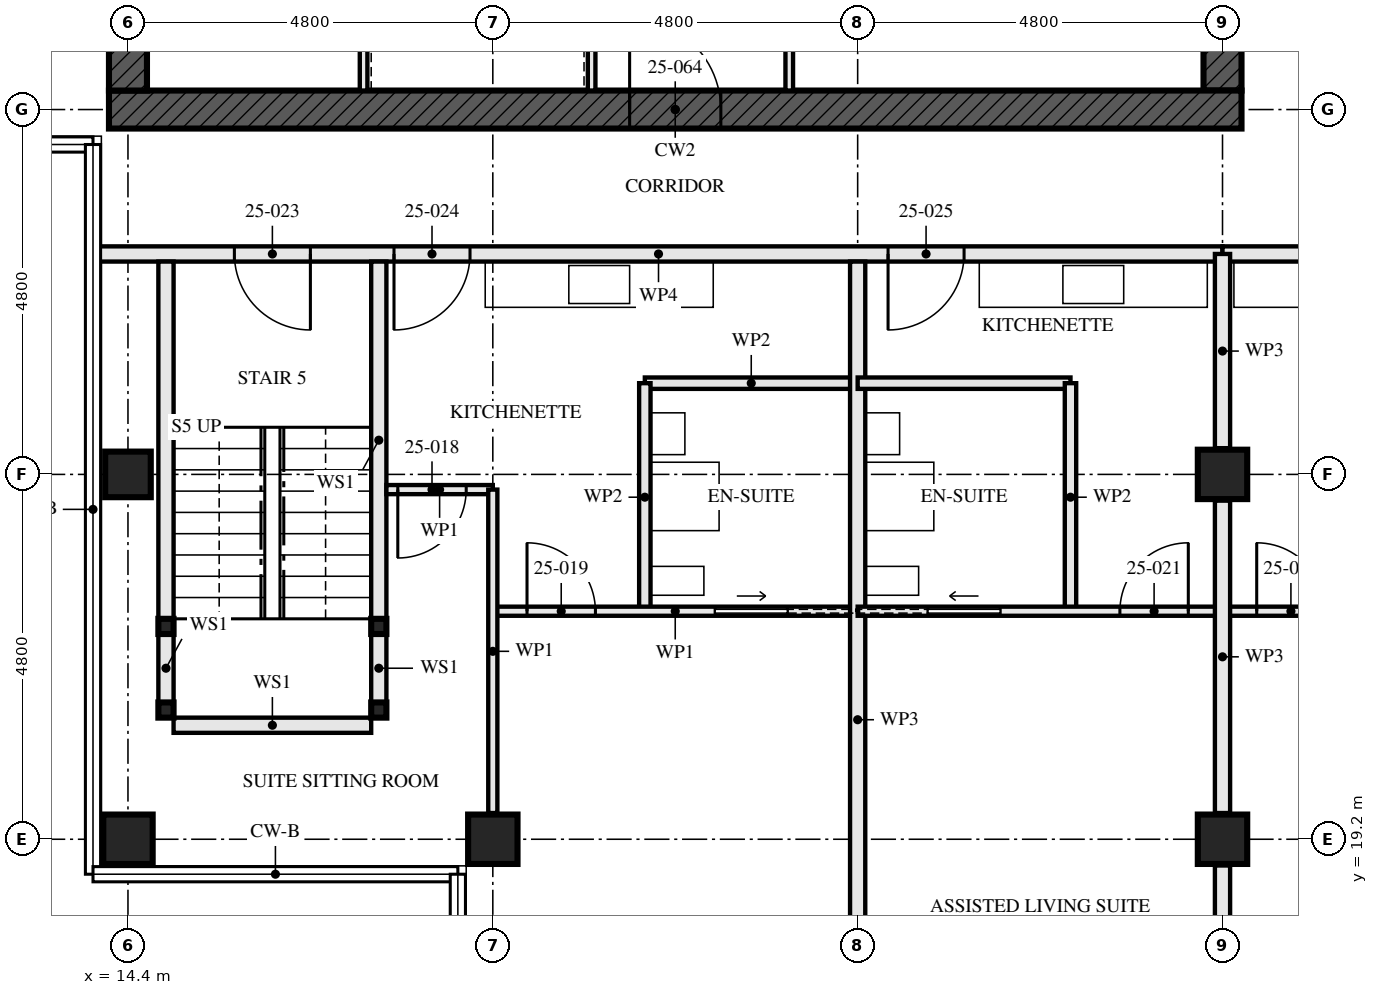
"""IFC4 building model, lengths in metres.
Left out: names, types, materials, properties, quantities, classifications, styles, units other than length and angle.
Written with IfcOpenShell. Run it as: python <this file> out.ifc"""

import sys

from ifc_helpers import new_model, si_unit, direction, frame, frame_2d, origin, origin_2d, place, context, subcontext, project, spatial, rectangle, hollow_rectangle, extrude, element, fill, save


model = new_model("IFC4")
c1 = context("Model", 3, precision=1e-05, world=origin(), true_north=direction((0.0, 1.0)))
c2 = subcontext(c1, "Body", "Model", "MODEL_VIEW")
j1 = project(units=[si_unit("LENGTHUNIT", "METRE"), si_unit("PLANEANGLEUNIT", "RADIAN")], contexts=[c1])
p1 = place(None, origin())
s1 = spatial("IfcSite", under=j1, at=p1, CompositionType="ELEMENT")
p2 = place(p1, origin())
s2 = spatial("IfcBuilding", under=s1, at=p2, CompositionType="ELEMENT")
p3 = place(p2, frame((0.0, 0.0, 94.5)))
s3 = spatial("IfcBuildingStorey", under=s2, at=p3, CompositionType="ELEMENT", Elevation=94.5)
p4 = place(p3, frame((14.4, 19.2, 0.0), z_axis=(0.0, 0.0, 1.0), x_axis=(0.0, 1.0, 0.0)))
e1 = element("IfcColumn", 1, at=p4, inside=s3, PredefinedType="COLUMN", context=c2, shape_type="SweptSolid", body=[
    extrude(hollow_rectangle(XDim=0.65, YDim=0.65, WallThickness=0.08, at=origin_2d()), origin(), (0.0, 0.0, 1.0), 3.5),
])
p5 = place(p3, frame((14.4, 24.0, 0.0), z_axis=(0.0, 0.0, 1.0), x_axis=(1.0, 0.0, 0.0)))
e2 = element("IfcColumn", 2, at=p5, inside=s3, PredefinedType="COLUMN", context=c2, shape_type="SweptSolid", body=[
    extrude(hollow_rectangle(XDim=0.6, YDim=0.6, WallThickness=0.08, at=origin_2d()), origin(), (0.0, 0.0, 1.0), 3.5),
])
p6 = place(p3, frame((19.2, 19.2, 0.0), z_axis=(0.0, 0.0, 1.0), x_axis=(0.0, 1.0, 0.0)))
e3 = element("IfcColumn", 3, at=p6, inside=s3, PredefinedType="COLUMN", context=c2, shape_type="SweptSolid", body=[
    extrude(hollow_rectangle(XDim=0.65, YDim=0.65, WallThickness=0.08, at=origin_2d()), origin(), (0.0, 0.0, 1.0), 3.5),
])
for number, where, z_axis, x_axis in (
    (4, (28.8, 19.2, 0.0), (0.0, 0.0, 1.0), (1.0, 0.0, 0.0)),
    (5, (28.8, 24.0, 0.0), (0.0, 0.0, 1.0), (1.0, 0.0, 0.0)),
):
    element("IfcColumn", number, at=place(p3, frame(where, z_axis=z_axis, x_axis=x_axis)), inside=s3, PredefinedType="COLUMN", context=c2, shape_type="SweptSolid", body=[
        extrude(hollow_rectangle(XDim=0.65, YDim=0.65, WallThickness=0.05, at=origin_2d()), origin(), (0.0, 0.0, 1.0), 3.5),
    ])
p7 = place(p3, frame((14.15, 28.8, -0.17), z_axis=(0.0, 0.0, 1.0), x_axis=(1.0, 0.0, 0.0)))
e6 = element("IfcWall", 6, at=p7, inside=s3, PredefinedType="SHEAR", context=c2, shape_type="SweptSolid", body=[
    extrude(rectangle(XDim=14.9, YDim=0.5, at=frame_2d((7.45, 0.0))), origin(), (0.0, 0.0, 1.0), 3.5),
])
p8 = place(p7, frame((6.85, 0.0, 0.17)))
e7 = element("IfcOpeningElement", 7, at=p8, cuts=e6, PredefinedType="OPENING", context=c2, shape_type="SweptSolid", body=[
    extrude(rectangle(XDim=1.2, YDim=2.1, at=frame_2d((0.6, 1.05))), frame((0.0, 0.26, 0.0), z_axis=(0.0, -1.0, 0.0), x_axis=(1.0, 0.0, 0.0)), (0.0, 0.0, 1.0), 0.521),
])
p9 = place(p3, frame((14.4, 42.95, -0.17), z_axis=(0.0, 0.0, 1.0), x_axis=(0.0, -1.0, 0.0)))
e8 = element("IfcWall", 8, at=p9, inside=s3, PredefinedType="SHEAR", context=c2, shape_type="SweptSolid", body=[
    extrude(rectangle(XDim=13.9, YDim=0.5, at=frame_2d((6.95, 0.0))), origin(), (0.0, 0.0, 1.0), 3.5),
])
p10 = place(p9, frame((6.35, 0.0, 0.17)))
e9 = element("IfcOpeningElement", 9, at=p10, cuts=e8, PredefinedType="OPENING", context=c2, shape_type="SweptSolid", body=[
    extrude(rectangle(XDim=1.2, YDim=2.1, at=frame_2d((0.6, 1.05))), frame((0.0, 0.26, 0.0), z_axis=(0.0, -1.0, 0.0), x_axis=(1.0, 0.0, 0.0)), (0.0, 0.0, 1.0), 0.521),
])
p11 = place(p3, frame((28.8, 29.05, -0.17), z_axis=(0.0, 0.0, 1.0), x_axis=(0.0, 1.0, 0.0)))
e10 = element("IfcWall", 10, at=p11, inside=s3, PredefinedType="SHEAR", context=c2, shape_type="SweptSolid", body=[
    extrude(rectangle(XDim=13.9, YDim=0.5, at=frame_2d((6.95, 0.0))), origin(), (0.0, 0.0, 1.0), 3.5),
])
p12 = place(p11, frame((6.35, 0.0, 0.17)))
e11 = element("IfcOpeningElement", 11, at=p12, cuts=e10, PredefinedType="OPENING", context=c2, shape_type="SweptSolid", body=[
    extrude(rectangle(XDim=1.2, YDim=2.1, at=frame_2d((0.6, 1.05))), frame((0.0, 0.26, 0.0), z_axis=(0.0, -1.0, 0.0), x_axis=(1.0, 0.0, 0.0)), (0.0, 0.0, 1.0), 0.521),
])
for number, where, z_axis, x_axis in (
    (12, (14.9, 20.9, 0.0), (0.0, 0.0, 1.0), (1.0, 0.0, 0.0)),
    (13, (17.7, 20.9, 0.0), (0.0, 0.0, 1.0), (1.0, 0.0, 0.0)),
    (14, (14.9, 22.0, 0.0), (0.0, 0.0, 1.0), (1.0, 0.0, 0.0)),
    (15, (17.7, 22.0, 0.0), (0.0, 0.0, 1.0), (1.0, 0.0, 0.0)),
):
    element("IfcColumn", number, at=place(p3, frame(where, z_axis=z_axis, x_axis=x_axis)), inside=s3, PredefinedType="COLUMN", context=c2, shape_type="SweptSolid", body=[
        extrude(hollow_rectangle(XDim=0.2, YDim=0.2, WallThickness=0.008, at=origin_2d()), origin(), (0.0, 0.0, 1.0), 3.33),
    ])
p13 = place(p3, frame((14.9, 21.0, 0.0), z_axis=(0.0, 0.0, 1.0), x_axis=(0.0, 1.0, 0.0)))
e16 = element("IfcWall", 16, at=p13, inside=s3, PredefinedType="SOLIDWALL", context=c2, shape_type="SweptSolid", body=[
    extrude(rectangle(XDim=0.9, YDim=0.2, at=frame_2d((0.45, 0.0))), origin(), (0.0, 0.0, 1.0), 2.99),
])
p14 = place(p3, frame((14.9, 22.1, 0.0), z_axis=(0.0, 0.0, 1.0), x_axis=(0.0, 1.0, 0.0)))
e17 = element("IfcWall", 17, at=p14, inside=s3, PredefinedType="SOLIDWALL", context=c2, shape_type="SweptSolid", body=[
    extrude(rectangle(XDim=4.7, YDim=0.2, at=frame_2d((2.35, 0.0))), origin(), (0.0, 0.0, 1.0), 2.99),
])
p15 = place(p3, frame((17.7, 21.0, 0.0), z_axis=(0.0, 0.0, 1.0), x_axis=(0.0, 1.0, 0.0)))
e18 = element("IfcWall", 18, at=p15, inside=s3, PredefinedType="SOLIDWALL", context=c2, shape_type="SweptSolid", body=[
    extrude(rectangle(XDim=0.9, YDim=0.2, at=frame_2d((0.45, 0.0))), origin(), (0.0, 0.0, 1.0), 2.99),
])
p16 = place(p3, frame((17.7, 22.1, 0.0), z_axis=(0.0, 0.0, 1.0), x_axis=(0.0, 1.0, 0.0)))
e19 = element("IfcWall", 19, at=p16, inside=s3, PredefinedType="SOLIDWALL", context=c2, shape_type="SweptSolid", body=[
    extrude(rectangle(XDim=4.7, YDim=0.2, at=frame_2d((2.35, 0.0))), origin(), (0.0, 0.0, 1.0), 2.99),
])
p17 = place(p3, frame((15.0, 20.7, 0.0), z_axis=(0.0, 0.0, 1.0), x_axis=(1.0, 0.0, 0.0)))
e20 = element("IfcWall", 20, at=p17, inside=s3, PredefinedType="SOLIDWALL", context=c2, shape_type="SweptSolid", body=[
    extrude(rectangle(XDim=2.6, YDim=0.2, at=frame_2d((1.3, 0.0))), origin(), (0.0, 0.0, 1.0), 3.33),
])
p18 = place(p3, frame((21.2, 22.2, 0.0), z_axis=(0.0, 0.0, 1.0), x_axis=(0.0, 1.0, 0.0)))
e21 = element("IfcWall", 21, at=p18, inside=s3, PredefinedType="PARTITIONING", context=c2, shape_type="SweptSolid", body=[
    extrude(rectangle(XDim=3.0, YDim=0.15, at=frame_2d((1.5, 0.0))), origin(), (0.0, 0.0, 1.0), 2.55),
])
p19 = place(p3, frame((21.2, 25.2, 0.0), z_axis=(0.0, 0.0, 1.0), x_axis=(1.0, 0.0, 0.0)))
e22 = element("IfcWall", 22, at=p19, inside=s3, PredefinedType="PARTITIONING", context=c2, shape_type="SweptSolid", body=[
    extrude(rectangle(XDim=2.8, YDim=0.15, at=frame_2d((1.4, 0.0))), origin(), (0.0, 0.0, 1.0), 3.33),
])
p20 = place(p3, frame((17.8, 23.8, 0.0), z_axis=(0.0, 0.0, 1.0), x_axis=(1.0, 0.0, 0.0)))
e23 = element("IfcWall", 23, at=p20, inside=s3, PredefinedType="PARTITIONING", context=c2, shape_type="SweptSolid", body=[
    extrude(rectangle(XDim=1.4, YDim=0.12, at=frame_2d((0.7, 0.0))), origin(), (0.0, 0.0, 1.0), 3.33),
])
p21 = place(p20, frame((0.15, 0.0, 0.0)))
e24 = element("IfcOpeningElement", 24, at=p21, cuts=e23, PredefinedType="OPENING", context=c2, shape_type="SweptSolid", body=[
    extrude(rectangle(XDim=0.9, YDim=2.1, at=frame_2d((0.45, 1.05))), frame((0.0, 0.071, 0.0), z_axis=(0.0, -1.0, 0.0), x_axis=(1.0, 0.0, 0.0)), (0.0, 0.0, 1.0), 0.141),
])
p22 = place(p3, frame((19.2, 22.2, 0.0), z_axis=(0.0, 0.0, 1.0), x_axis=(1.0, 0.0, 0.0)))
e25 = element("IfcWall", 25, at=p22, inside=s3, PredefinedType="PARTITIONING", context=c2, shape_type="SweptSolid", body=[
    extrude(rectangle(XDim=4.8, YDim=0.12, at=frame_2d((2.4, 0.0))), origin(), (0.0, 0.0, 1.0), 3.33),
])
p23 = place(p22, frame((0.45, 0.0, 0.0)))
e26 = element("IfcOpeningElement", 26, at=p23, cuts=e25, PredefinedType="OPENING", context=c2, shape_type="SweptSolid", body=[
    extrude(rectangle(XDim=0.9, YDim=2.1, at=frame_2d((0.45, 1.05))), frame((0.0, 0.071, 0.0), z_axis=(0.0, -1.0, 0.0), x_axis=(1.0, 0.0, 0.0)), (0.0, 0.0, 1.0), 0.141),
])
p24 = place(p22, frame((2.925, 0.0, 0.0)))
e27 = element("IfcOpeningElement", 27, at=p24, cuts=e25, PredefinedType="OPENING", context=c2, shape_type="SweptSolid", body=[
    extrude(rectangle(XDim=0.95, YDim=2.1, at=frame_2d((0.475, 1.05))), frame((0.0, 0.071, 0.0), z_axis=(0.0, -1.0, 0.0), x_axis=(1.0, 0.0, 0.0)), (0.0, 0.0, 1.0), 0.141),
])
p25 = place(p3, frame((19.2, 19.545, 0.0), z_axis=(0.0, 0.0, 1.0), x_axis=(0.0, 1.0, 0.0)))
e28 = element("IfcWall", 28, at=p25, inside=s3, PredefinedType="PARTITIONING", context=c2, shape_type="SweptSolid", body=[
    extrude(rectangle(XDim=4.255, YDim=0.12, at=frame_2d((2.127, 0.0))), origin(), (0.0, 0.0, 1.0), 2.55),
])
p26 = place(p3, frame((24.0, 14.745, 0.0), z_axis=(0.0, 0.0, 1.0), x_axis=(0.0, 1.0, 0.0)))
e29 = element("IfcWall", 29, at=p26, inside=s3, PredefinedType="PARTITIONING", context=c2, shape_type="SweptSolid", body=[
    extrude(rectangle(XDim=12.055, YDim=0.2, at=frame_2d((6.027, 0.0))), origin(), (0.0, 0.0, 1.0), 2.55),
])
p27 = place(p3, frame((26.8, 22.2, 0.0), z_axis=(0.0, 0.0, 1.0), x_axis=(0.0, 1.0, 0.0)))
e30 = element("IfcWall", 30, at=p27, inside=s3, PredefinedType="PARTITIONING", context=c2, shape_type="SweptSolid", body=[
    extrude(rectangle(XDim=3.0, YDim=0.15, at=frame_2d((1.5, 0.0))), origin(), (0.0, 0.0, 1.0), 2.55),
])
p28 = place(p3, frame((24.0, 25.2, 0.0), z_axis=(0.0, 0.0, 1.0), x_axis=(1.0, 0.0, 0.0)))
e31 = element("IfcWall", 31, at=p28, inside=s3, PredefinedType="PARTITIONING", context=c2, shape_type="SweptSolid", body=[
    extrude(rectangle(XDim=2.8, YDim=0.15, at=frame_2d((1.4, 0.0))), origin(), (0.0, 0.0, 1.0), 3.33),
])
p29 = place(p3, frame((24.0, 22.2, 0.0), z_axis=(0.0, 0.0, 1.0), x_axis=(1.0, 0.0, 0.0)))
e32 = element("IfcWall", 32, at=p29, inside=s3, PredefinedType="PARTITIONING", context=c2, shape_type="SweptSolid", body=[
    extrude(rectangle(XDim=4.8, YDim=0.12, at=frame_2d((2.4, 0.0))), origin(), (0.0, 0.0, 1.0), 3.33),
])
p30 = place(p29, frame((3.45, 0.0, 0.0)))
e33 = element("IfcOpeningElement", 33, at=p30, cuts=e32, PredefinedType="OPENING", context=c2, shape_type="SweptSolid", body=[
    extrude(rectangle(XDim=0.9, YDim=2.1, at=frame_2d((0.45, 1.05))), frame((0.0, 0.071, 0.0), z_axis=(0.0, -1.0, 0.0), x_axis=(1.0, 0.0, 0.0)), (0.0, 0.0, 1.0), 0.141),
])
p31 = place(p29, frame((0.925, 0.0, 0.0)))
e34 = element("IfcOpeningElement", 34, at=p31, cuts=e32, PredefinedType="OPENING", context=c2, shape_type="SweptSolid", body=[
    extrude(rectangle(XDim=0.95, YDim=2.1, at=frame_2d((0.475, 1.05))), frame((0.0, 0.071, 0.0), z_axis=(0.0, -1.0, 0.0), x_axis=(1.0, 0.0, 0.0)), (0.0, 0.0, 1.0), 0.141),
])
p32 = place(p3, frame((13.96, 26.9, 0.0), z_axis=(0.0, 0.0, 1.0), x_axis=(1.0, 0.0, 0.0)))
e35 = element("IfcWall", 35, at=p32, inside=s3, PredefinedType="PARTITIONING", context=c2, shape_type="SweptSolid", body=[
    extrude(rectangle(XDim=14.84, YDim=0.2, at=frame_2d((7.42, 0.0))), origin(), (0.0, 0.0, 1.0), 2.32),
])
p33 = place(p32, frame((1.84, 0.0, 0.0)))
e36 = element("IfcOpeningElement", 36, at=p33, cuts=e35, PredefinedType="OPENING", context=c2, shape_type="SweptSolid", body=[
    extrude(rectangle(XDim=1.0, YDim=2.1, at=frame_2d((0.5, 1.05))), frame((0.0, 0.111, 0.0), z_axis=(0.0, -1.0, 0.0), x_axis=(1.0, 0.0, 0.0)), (0.0, 0.0, 1.0), 0.221),
])
p34 = place(p32, frame((3.94, 0.0, 0.0)))
e37 = element("IfcOpeningElement", 37, at=p34, cuts=e35, PredefinedType="OPENING", context=c2, shape_type="SweptSolid", body=[
    extrude(rectangle(XDim=1.0, YDim=2.1, at=frame_2d((0.5, 1.05))), frame((0.0, 0.111, 0.0), z_axis=(0.0, -1.0, 0.0), x_axis=(1.0, 0.0, 0.0)), (0.0, 0.0, 1.0), 0.221),
])
p35 = place(p32, frame((10.44, 0.0, 0.0)))
e38 = element("IfcOpeningElement", 38, at=p35, cuts=e35, PredefinedType="OPENING", context=c2, shape_type="SweptSolid", body=[
    extrude(rectangle(XDim=1.0, YDim=2.1, at=frame_2d((0.5, 1.05))), frame((0.0, 0.111, 0.0), z_axis=(0.0, -1.0, 0.0), x_axis=(1.0, 0.0, 0.0)), (0.0, 0.0, 1.0), 0.221),
])
p36 = place(p3, frame((28.8, 22.2, 0.0), z_axis=(0.0, 0.0, 1.0), x_axis=(1.0, 0.0, 0.0)))
e39 = element("IfcWall", 39, at=p36, inside=s3, PredefinedType="PARTITIONING", context=c2, shape_type="SweptSolid", body=[
    extrude(rectangle(XDim=4.8, YDim=0.12, at=frame_2d((2.4, 0.0))), origin(), (0.0, 0.0, 1.0), 3.33),
])
p37 = place(p36, frame((0.45, 0.0, 0.0)))
e40 = element("IfcOpeningElement", 40, at=p37, cuts=e39, PredefinedType="OPENING", context=c2, shape_type="SweptSolid", body=[
    extrude(rectangle(XDim=0.9, YDim=2.1, at=frame_2d((0.45, 1.05))), frame((0.0, 0.071, 0.0), z_axis=(0.0, -1.0, 0.0), x_axis=(1.0, 0.0, 0.0)), (0.0, 0.0, 1.0), 0.141),
])
p38 = place(p3, frame((28.8, 26.9, 0.0), z_axis=(0.0, 0.0, 1.0), x_axis=(1.0, 0.0, 0.0)))
e41 = element("IfcWall", 41, at=p38, inside=s3, PredefinedType="PARTITIONING", context=c2, shape_type="SweptSolid", body=[
    extrude(rectangle(XDim=9.6, YDim=0.2, at=frame_2d((4.8, 0.0))), origin(), (0.0, 0.0, 1.0), 3.33),
])
p39 = place(p38, frame((5.2, 0.0, 0.0)))
e42 = element("IfcOpeningElement", 42, at=p39, cuts=e41, PredefinedType="OPENING", context=c2, shape_type="SweptSolid", body=[
    extrude(rectangle(XDim=1.0, YDim=2.1, at=frame_2d((0.5, 1.05))), frame((0.0, 0.111, 0.0), z_axis=(0.0, -1.0, 0.0), x_axis=(1.0, 0.0, 0.0)), (0.0, 0.0, 1.0), 0.221),
])
p40 = place(p3, frame((20.5, 29.05, 0.0), z_axis=(0.0, 0.0, 1.0), x_axis=(0.0, 1.0, 0.0)))
e43 = element("IfcWall", 43, at=p40, inside=s3, PredefinedType="SOLIDWALL", context=c2, shape_type="SweptSolid", body=[
    extrude(rectangle(XDim=5.8, YDim=0.1, at=frame_2d((2.9, 0.0))), origin(), (0.0, 0.0, 1.0), 3.33),
])
p41 = place(p40, frame((0.8, 0.0, 0.0)))
e44 = element("IfcOpeningElement", 44, at=p41, cuts=e43, PredefinedType="OPENING", context=c2, shape_type="SweptSolid", body=[
    extrude(rectangle(XDim=1.1, YDim=2.3, at=frame_2d((0.55, 1.15))), frame((0.0, 0.061, 0.0), z_axis=(0.0, -1.0, 0.0), x_axis=(1.0, 0.0, 0.0)), (0.0, 0.0, 1.0), 0.121),
])
p42 = place(p40, frame((3.775, 0.0, 0.0)))
e45 = element("IfcOpeningElement", 45, at=p42, cuts=e43, PredefinedType="OPENING", context=c2, shape_type="SweptSolid", body=[
    extrude(rectangle(XDim=1.1, YDim=2.3, at=frame_2d((0.55, 1.15))), frame((0.0, 0.061, 0.0), z_axis=(0.0, -1.0, 0.0), x_axis=(1.0, 0.0, 0.0)), (0.0, 0.0, 1.0), 0.121),
])
p43 = place(p3, frame((23.1, 29.05, 0.0), z_axis=(0.0, 0.0, 1.0), x_axis=(0.0, 1.0, 0.0)))
e46 = element("IfcWall", 46, at=p43, inside=s3, PredefinedType="SOLIDWALL", context=c2, shape_type="SweptSolid", body=[
    extrude(rectangle(XDim=5.8, YDim=0.1, at=frame_2d((2.9, 0.0))), origin(), (0.0, 0.0, 1.0), 3.33),
])
p44 = place(p43, frame((1.0, 0.0, 0.0)))
e47 = element("IfcOpeningElement", 47, at=p44, cuts=e46, PredefinedType="OPENING", context=c2, shape_type="SweptSolid", body=[
    extrude(rectangle(XDim=0.7, YDim=2.1, at=frame_2d((0.35, 1.05))), frame((0.0, 0.061, 0.0), z_axis=(0.0, -1.0, 0.0), x_axis=(1.0, 0.0, 0.0)), (0.0, 0.0, 1.0), 0.121),
])
p45 = place(p3, frame((17.5, 29.05, 0.0), z_axis=(0.0, 0.0, 1.0), x_axis=(0.0, 1.0, 0.0)))
e48 = element("IfcWall", 48, at=p45, inside=s3, PredefinedType="SOLIDWALL", context=c2, shape_type="SweptSolid", body=[
    extrude(rectangle(XDim=5.8, YDim=0.1, at=frame_2d((2.9, 0.0))), origin(), (0.0, 0.0, 1.0), 3.33),
])
p46 = place(p3, frame((28.8, 14.647, 0.0), z_axis=(0.0, 0.0, 1.0), x_axis=(0.0, 1.0, 0.0)))
e49 = element("IfcWall", 49, at=p46, inside=s3, PredefinedType="PARTITIONING", context=c2, shape_type="SweptSolid", body=[
    extrude(rectangle(XDim=4.208, YDim=0.2, at=frame_2d((2.104, 0.0))), origin(), (0.0, 0.0, 1.0), 2.32),
])
p47 = place(p3, frame((28.8, 19.545, 0.0), z_axis=(0.0, 0.0, 1.0), x_axis=(0.0, 1.0, 0.0)))
e50 = element("IfcWall", 50, at=p47, inside=s3, PredefinedType="PARTITIONING", context=c2, shape_type="SweptSolid", body=[
    extrude(rectangle(XDim=4.11, YDim=0.2, at=frame_2d((2.055, 0.0))), origin(), (0.0, 0.0, 1.0), 2.32),
])
p48 = place(p3, frame((28.8, 24.345, 0.0), z_axis=(0.0, 0.0, 1.0), x_axis=(0.0, 1.0, 0.0)))
e51 = element("IfcWall", 51, at=p48, inside=s3, PredefinedType="PARTITIONING", context=c2, shape_type="SweptSolid", body=[
    extrude(rectangle(XDim=2.555, YDim=0.2, at=frame_2d((1.277, 0.0))), origin(), (0.0, 0.0, 1.0), 2.32),
])
p49 = place(p21, frame((0.9, 0.0, 0.0), z_axis=(0.0, 0.0, 1.0), x_axis=(-1.0, 0.0, 0.0)))
e52 = element("IfcDoor", 52, at=p49, inside=s3, OperationType="SINGLE_SWING_LEFT", PredefinedType="DOOR", context=c2, shape_type="SweptSolid", body=[
    extrude(rectangle(XDim=0.9, YDim=2.1, at=frame_2d((0.45, 1.05))), frame((0.0, 0.022, 0.0), z_axis=(0.0, -1.0, 0.0), x_axis=(1.0, 0.0, 0.0)), (0.0, 0.0, 1.0), 0.044),
])
fill(e24, e52)
p50 = place(p23, origin())
e53 = element("IfcDoor", 53, at=p50, inside=s3, OperationType="SINGLE_SWING_RIGHT", PredefinedType="DOOR", context=c2, shape_type="SweptSolid", body=[
    extrude(rectangle(XDim=0.9, YDim=2.1, at=frame_2d((0.45, 1.05))), frame((0.0, 0.022, 0.0), z_axis=(0.0, -1.0, 0.0), x_axis=(1.0, 0.0, 0.0)), (0.0, 0.0, 1.0), 0.044),
])
fill(e26, e53)
p51 = place(p24, origin())
e54 = element("IfcDoor", 54, at=p51, inside=s3, OperationType="SLIDING_TO_LEFT", PredefinedType="DOOR", context=c2, shape_type="SweptSolid", body=[
    extrude(rectangle(XDim=0.95, YDim=2.1, at=frame_2d((0.475, 1.05))), frame((0.0, 0.022, 0.0), z_axis=(0.0, -1.0, 0.0), x_axis=(1.0, 0.0, 0.0)), (0.0, 0.0, 1.0), 0.044),
])
fill(e27, e54)
p52 = place(p30, origin())
e55 = element("IfcDoor", 55, at=p52, inside=s3, OperationType="SINGLE_SWING_LEFT", PredefinedType="DOOR", context=c2, shape_type="SweptSolid", body=[
    extrude(rectangle(XDim=0.9, YDim=2.1, at=frame_2d((0.45, 1.05))), frame((0.0, 0.022, 0.0), z_axis=(0.0, -1.0, 0.0), x_axis=(1.0, 0.0, 0.0)), (0.0, 0.0, 1.0), 0.044),
])
fill(e33, e55)
p53 = place(p31, origin())
e56 = element("IfcDoor", 56, at=p53, inside=s3, OperationType="SLIDING_TO_RIGHT", PredefinedType="DOOR", context=c2, shape_type="SweptSolid", body=[
    extrude(rectangle(XDim=0.95, YDim=2.1, at=frame_2d((0.475, 1.05))), frame((0.0, 0.022, 0.0), z_axis=(0.0, -1.0, 0.0), x_axis=(1.0, 0.0, 0.0)), (0.0, 0.0, 1.0), 0.044),
])
fill(e34, e56)
p54 = place(p33, frame((1.0, 0.0, 0.0), z_axis=(0.0, 0.0, 1.0), x_axis=(-1.0, 0.0, 0.0)))
e57 = element("IfcDoor", 57, at=p54, inside=s3, OperationType="SINGLE_SWING_RIGHT", PredefinedType="DOOR", context=c2, shape_type="SweptSolid", body=[
    extrude(rectangle(XDim=1.0, YDim=2.1, at=frame_2d((0.5, 1.05))), frame((0.0, 0.032, 0.0), z_axis=(0.0, -1.0, 0.0), x_axis=(1.0, 0.0, 0.0)), (0.0, 0.0, 1.0), 0.064),
])
fill(e36, e57)
p55 = place(p34, frame((1.0, 0.0, 0.0), z_axis=(0.0, 0.0, 1.0), x_axis=(-1.0, 0.0, 0.0)))
e58 = element("IfcDoor", 58, at=p55, inside=s3, OperationType="SINGLE_SWING_LEFT", PredefinedType="DOOR", context=c2, shape_type="SweptSolid", body=[
    extrude(rectangle(XDim=1.0, YDim=2.1, at=frame_2d((0.5, 1.05))), frame((0.0, 0.027, 0.0), z_axis=(0.0, -1.0, 0.0), x_axis=(1.0, 0.0, 0.0)), (0.0, 0.0, 1.0), 0.054),
])
fill(e37, e58)
p56 = place(p35, frame((1.0, 0.0, 0.0), z_axis=(0.0, 0.0, 1.0), x_axis=(-1.0, 0.0, 0.0)))
e59 = element("IfcDoor", 59, at=p56, inside=s3, OperationType="SINGLE_SWING_LEFT", PredefinedType="DOOR", context=c2, shape_type="SweptSolid", body=[
    extrude(rectangle(XDim=1.0, YDim=2.1, at=frame_2d((0.5, 1.05))), frame((0.0, 0.027, 0.0), z_axis=(0.0, -1.0, 0.0), x_axis=(1.0, 0.0, 0.0)), (0.0, 0.0, 1.0), 0.054),
])
fill(e38, e59)
p57 = place(p37, origin())
e60 = element("IfcDoor", 60, at=p57, inside=s3, OperationType="SINGLE_SWING_RIGHT", PredefinedType="DOOR", context=c2, shape_type="SweptSolid", body=[
    extrude(rectangle(XDim=0.9, YDim=2.1, at=frame_2d((0.45, 1.05))), frame((0.0, 0.022, 0.0), z_axis=(0.0, -1.0, 0.0), x_axis=(1.0, 0.0, 0.0)), (0.0, 0.0, 1.0), 0.044),
])
fill(e40, e60)
p58 = place(p8, origin())
e61 = element("IfcDoor", 61, at=p58, inside=s3, OperationType="SINGLE_SWING_LEFT", PredefinedType="DOOR", context=c2, shape_type="SweptSolid", body=[
    extrude(rectangle(XDim=1.2, YDim=2.1, at=frame_2d((0.6, 1.05))), frame((0.0, 0.027, 0.0), z_axis=(0.0, -1.0, 0.0), x_axis=(1.0, 0.0, 0.0)), (0.0, 0.0, 1.0), 0.054),
])
fill(e7, e61)
save(model, sys.argv[1])
